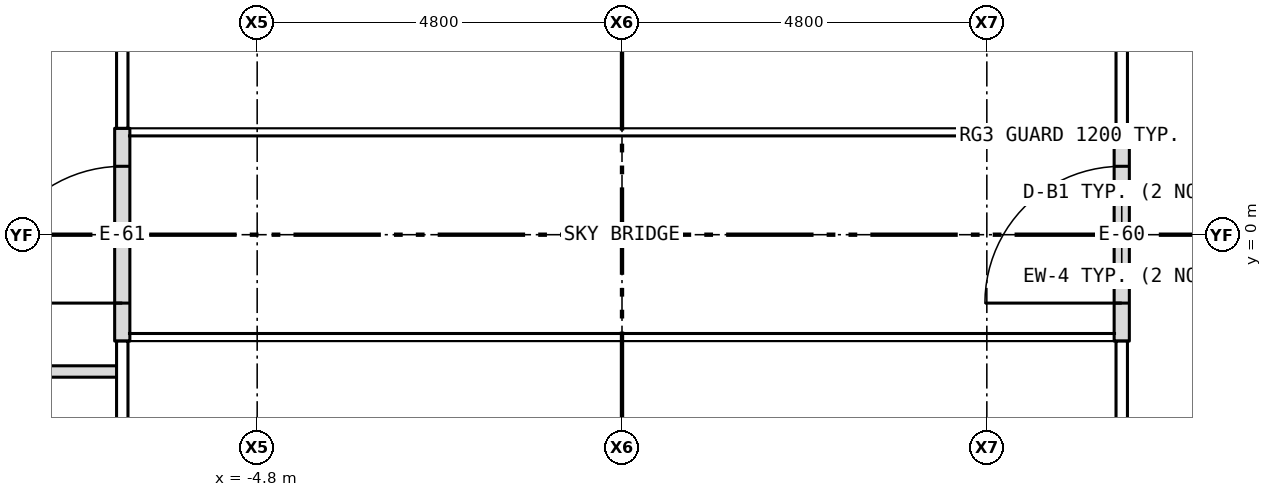
"""IFC4 building model, lengths in metres.
Left out: names, types, materials, properties, quantities, classifications, styles, units other than length and angle.
Written with IfcOpenShell. Run it as: python <this file> out.ifc"""

import sys

from ifc_helpers import new_model, si_unit, direction, frame, frame_2d, origin, place, context, subcontext, project, spatial, rectangle, extrude, element, fill, save


model = new_model("IFC4")
c1 = context("Model", 3, precision=1e-05, world=origin(), true_north=direction((0.0, 1.0)))
c2 = subcontext(c1, "Body", "Model", "MODEL_VIEW")
j1 = project(units=[si_unit("LENGTHUNIT", "METRE"), si_unit("PLANEANGLEUNIT", "RADIAN")], contexts=[c1])
p1 = place(None, origin())
s1 = spatial("IfcSite", under=j1, at=p1, CompositionType="ELEMENT")
p2 = place(p1, origin())
s2 = spatial("IfcBuilding", under=s1, at=p2, CompositionType="ELEMENT")
p3 = place(p2, frame((0.0, 0.0, 226.0)))
s3 = spatial("IfcBuildingStorey", under=s2, at=p3, CompositionType="ELEMENT", Elevation=226.0)
p4 = place(p3, frame((6.575, -1.4, 0.0), z_axis=(0.0, 0.0, 1.0), x_axis=(0.0, 1.0, 0.0)))
e1 = element("IfcWall", 1, at=p4, inside=s3, PredefinedType="SOLIDWALL", context=c2, shape_type="SweptSolid", body=[
    extrude(rectangle(XDim=2.8, YDim=0.2, at=frame_2d((1.4, 0.0))), origin(), (0.0, 0.0, 1.0), 3.5),
])
p5 = place(p4, frame((0.5, 0.0, 0.0)))
e2 = element("IfcOpeningElement", 2, at=p5, cuts=e1, PredefinedType="OPENING", context=c2, shape_type="SweptSolid", body=[
    extrude(rectangle(XDim=1.8, YDim=2.1, at=frame_2d((0.9, 1.05))), frame((0.0, 0.112, 0.0), z_axis=(0.0, -1.0, 0.0), x_axis=(1.0, 0.0, 0.0)), (0.0, 0.0, 1.0), 0.224),
])
p6 = place(p3, frame((-6.575, -1.4, 0.0), z_axis=(0.0, 0.0, 1.0), x_axis=(0.0, 1.0, 0.0)))
e3 = element("IfcWall", 3, at=p6, inside=s3, PredefinedType="SOLIDWALL", context=c2, shape_type="SweptSolid", body=[
    extrude(rectangle(XDim=2.8, YDim=0.2, at=frame_2d((1.4, 0.0))), origin(), (0.0, 0.0, 1.0), 3.5),
])
p7 = place(p6, frame((0.5, 0.0, 0.0)))
e4 = element("IfcOpeningElement", 4, at=p7, cuts=e3, PredefinedType="OPENING", context=c2, shape_type="SweptSolid", body=[
    extrude(rectangle(XDim=1.8, YDim=2.1, at=frame_2d((0.9, 1.05))), frame((0.0, 0.112, 0.0), z_axis=(0.0, -1.0, 0.0), x_axis=(1.0, 0.0, 0.0)), (0.0, 0.0, 1.0), 0.224),
])
p8 = place(p3, frame((-12.4, -1.8, 0.0), z_axis=(0.0, 0.0, 1.0), x_axis=(1.0, 0.0, 0.0)))
e5 = element("IfcWall", 5, at=p8, inside=s3, PredefinedType="PARTITIONING", context=c2, shape_type="SweptSolid", body=[
    extrude(rectangle(XDim=5.78, YDim=0.15, at=frame_2d((2.89, 0.0))), origin(), (0.0, 0.0, 1.0), 3.35),
])
p9 = place(p5, origin())
e6 = element("IfcDoor", 6, at=p9, inside=s3, OperationType="DOUBLE_DOOR_DOUBLE_SWING", PredefinedType="DOOR", context=c2, shape_type="SweptSolid", body=[
    extrude(rectangle(XDim=1.8, YDim=2.1, at=frame_2d((0.9, 1.05))), frame((0.0, 0.025, 0.0), z_axis=(0.0, -1.0, 0.0), x_axis=(1.0, 0.0, 0.0)), (0.0, 0.0, 1.0), 0.05),
])
fill(e2, e6)
p10 = place(p7, origin())
e7 = element("IfcDoor", 7, at=p10, inside=s3, OperationType="DOUBLE_DOOR_DOUBLE_SWING", PredefinedType="DOOR", context=c2, shape_type="SweptSolid", body=[
    extrude(rectangle(XDim=1.8, YDim=2.1, at=frame_2d((0.9, 1.05))), frame((0.0, 0.025, 0.0), z_axis=(0.0, -1.0, 0.0), x_axis=(1.0, 0.0, 0.0)), (0.0, 0.0, 1.0), 0.05),
])
fill(e4, e7)
save(model, sys.argv[1])
